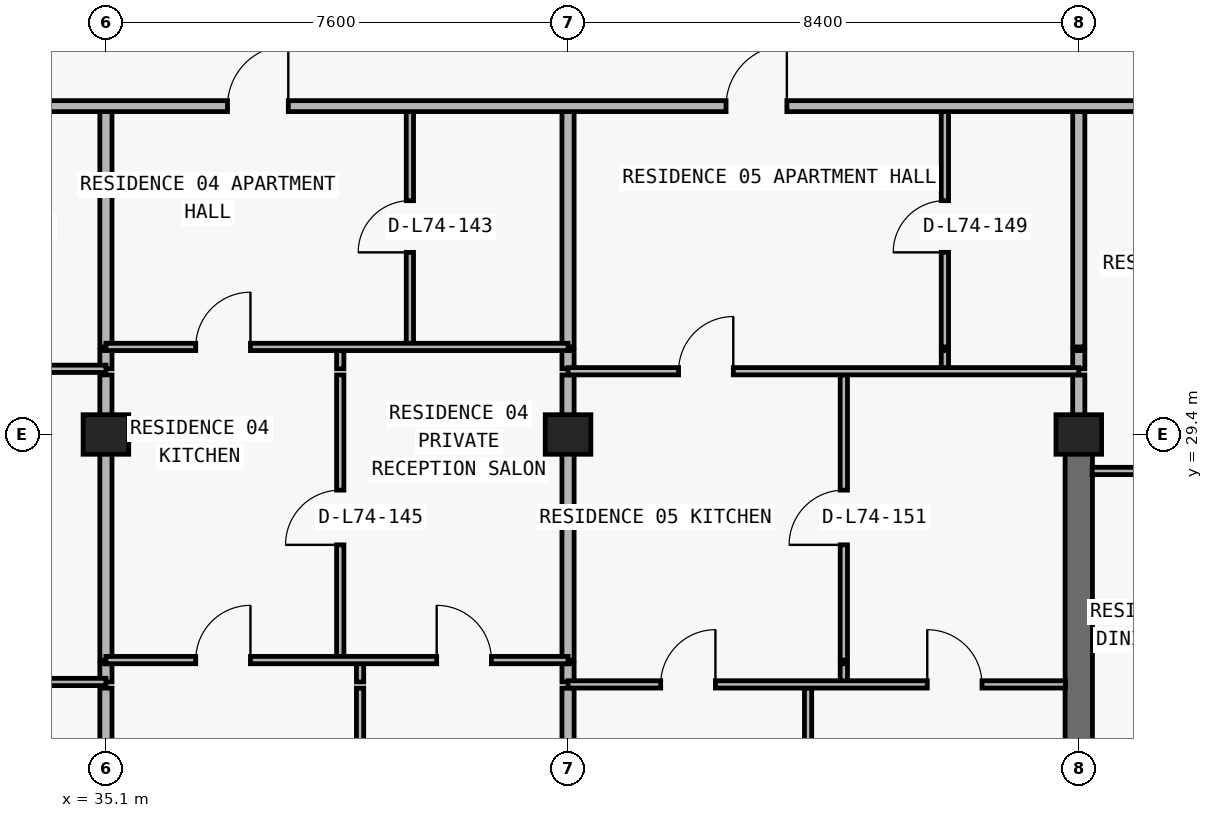
"""IFC4 building model, lengths in metres.
Left out: names, types, materials, properties, quantities, classifications, styles, units other than length and angle.
Written with IfcOpenShell. Run it as: python <this file> out.ifc"""

import sys

from ifc_helpers import new_model, si_unit, direction, frame, frame_2d, origin, origin_2d, place, context, subcontext, project, spatial, rectangle, extrude, element, fill, save


model = new_model("IFC4")
c1 = context("Model", 3, precision=1e-05, world=origin(), true_north=direction((0.0, 1.0)))
c2 = subcontext(c1, "Body", "Model", "MODEL_VIEW")
j1 = project(units=[si_unit("LENGTHUNIT", "METRE"), si_unit("PLANEANGLEUNIT", "RADIAN")], contexts=[c1])
p1 = place(None, origin())
s1 = spatial("IfcSite", under=j1, at=p1, CompositionType="ELEMENT")
p2 = place(p1, origin())
s2 = spatial("IfcBuilding", under=s1, at=p2, CompositionType="ELEMENT")
p3 = place(p2, frame((0.0, 0.0, 262.8)))
s3 = spatial("IfcBuildingStorey", under=s2, at=p3, CompositionType="ELEMENT", Elevation=262.8)
for number, where, z_axis, x_axis in (
    (1, (35.1, 29.4, 0.0), (0.0, 0.0, 1.0), (1.0, 0.0, 0.0)),
    (2, (42.7, 29.4, 0.0), (0.0, 0.0, 1.0), (1.0, 0.0, 0.0)),
    (3, (51.1, 29.4, 0.0), (0.0, 0.0, 1.0), (1.0, 0.0, 0.0)),
):
    element("IfcColumn", number, at=place(p3, frame(where, z_axis=z_axis, x_axis=x_axis)), inside=s3, PredefinedType="COLUMN", context=c2, shape_type="SweptSolid", body=[
        extrude(rectangle(XDim=0.75, YDim=0.65, at=origin_2d()), origin(), (0.0, 0.0, 1.0), 3.05),
    ])
p4 = place(p3, frame((51.1, 20.8, 0.0), z_axis=(0.0, 0.0, 1.0), x_axis=(0.0, 1.0, 0.0)))
e4 = element("IfcWall", 4, at=p4, inside=s3, PredefinedType="SHEAR", context=c2, shape_type="SweptSolid", body=[
    extrude(rectangle(XDim=8.6, YDim=0.45, at=frame_2d((4.3, 0.0))), origin(), (0.0, 0.0, 1.0), 3.05),
])
p5 = place(p3, frame((35.1, 13.34, 0.0), z_axis=(0.0, 0.0, 1.0), x_axis=(0.0, 1.0, 0.0)))
e5 = element("IfcWall", 5, at=p5, inside=s3, PredefinedType="PARTITIONING", context=c2, shape_type="SweptSolid", body=[
    extrude(rectangle(XDim=11.89, YDim=0.2, at=frame_2d((5.945, 0.0))), origin(), (0.0, 0.0, 1.0), 2.263),
])
p6 = place(p3, frame((35.1, 25.33, 0.0), z_axis=(0.0, 0.0, 1.0), x_axis=(0.0, 1.0, 0.0)))
e6 = element("IfcWall", 6, at=p6, inside=s3, PredefinedType="PARTITIONING", context=c2, shape_type="SweptSolid", body=[
    extrude(rectangle(XDim=0.3, YDim=0.2, at=frame_2d((0.15, 0.0))), origin(), (0.0, 0.0, 1.0), 2.263),
])
p7 = place(p3, frame((35.1, 25.69, 0.0), z_axis=(0.0, 0.0, 1.0), x_axis=(0.0, 1.0, 0.0)))
e7 = element("IfcWall", 7, at=p7, inside=s3, PredefinedType="PARTITIONING", context=c2, shape_type="SweptSolid", body=[
    extrude(rectangle(XDim=4.69, YDim=0.2, at=frame_2d((2.345, 0.0))), origin(), (0.0, 0.0, 1.0), 2.263),
])
p8 = place(p3, frame((35.1, 30.48, 0.0), z_axis=(0.0, 0.0, 1.0), x_axis=(0.0, 1.0, 0.0)))
e8 = element("IfcWall", 8, at=p8, inside=s3, PredefinedType="PARTITIONING", context=c2, shape_type="SweptSolid", body=[
    extrude(rectangle(XDim=0.3, YDim=0.2, at=frame_2d((0.15, 0.0))), origin(), (0.0, 0.0, 1.0), 2.263),
])
p9 = place(p3, frame((35.1, 30.84, 0.0), z_axis=(0.0, 0.0, 1.0), x_axis=(0.0, 1.0, 0.0)))
e9 = element("IfcWall", 9, at=p9, inside=s3, PredefinedType="PARTITIONING", context=c2, shape_type="SweptSolid", body=[
    extrude(rectangle(XDim=3.96, YDim=0.2, at=frame_2d((1.98, 0.0))), origin(), (0.0, 0.0, 1.0), 2.263),
])
p10 = place(p3, frame((38.954, 25.69, 0.0), z_axis=(0.0, 0.0, 1.0), x_axis=(0.0, 1.0, 0.0)))
e10 = element("IfcWall", 10, at=p10, inside=s3, PredefinedType="PARTITIONING", context=c2, shape_type="SweptSolid", body=[
    extrude(rectangle(XDim=4.69, YDim=0.12, at=frame_2d((2.345, 0.0))), origin(), (0.0, 0.0, 1.0), 2.725),
])
p11 = place(p10, frame((1.895, 0.0, 0.0)))
e11 = element("IfcOpeningElement", 11, at=p11, cuts=e10, PredefinedType="OPENING", context=c2, shape_type="SweptSolid", body=[
    extrude(rectangle(XDim=0.9, YDim=2.15, at=frame_2d((0.45, 1.075))), frame((0.0, 0.07, 0.0), z_axis=(0.0, -1.0, 0.0), x_axis=(1.0, 0.0, 0.0)), (0.0, 0.0, 1.0), 0.14),
])
p12 = place(p3, frame((38.954, 30.48, 0.0), z_axis=(0.0, 0.0, 1.0), x_axis=(0.0, 1.0, 0.0)))
e12 = element("IfcWall", 12, at=p12, inside=s3, PredefinedType="PARTITIONING", context=c2, shape_type="SweptSolid", body=[
    extrude(rectangle(XDim=0.3, YDim=0.12, at=frame_2d((0.15, 0.0))), origin(), (0.0, 0.0, 1.0), 2.725),
])
p13 = place(p3, frame((39.28, 13.34, 0.0), z_axis=(0.0, 0.0, 1.0), x_axis=(0.0, 1.0, 0.0)))
e13 = element("IfcWall", 13, at=p13, inside=s3, PredefinedType="PARTITIONING", context=c2, shape_type="SweptSolid", body=[
    extrude(rectangle(XDim=11.89, YDim=0.12, at=frame_2d((5.945, 0.0))), origin(), (0.0, 0.0, 1.0), 3.05),
])
p14 = place(p3, frame((39.28, 25.33, 0.0), z_axis=(0.0, 0.0, 1.0), x_axis=(0.0, 1.0, 0.0)))
e14 = element("IfcWall", 14, at=p14, inside=s3, PredefinedType="PARTITIONING", context=c2, shape_type="SweptSolid", body=[
    extrude(rectangle(XDim=0.3, YDim=0.12, at=frame_2d((0.15, 0.0))), origin(), (0.0, 0.0, 1.0), 3.05),
])
p15 = place(p3, frame((40.099, 30.84, 0.0), z_axis=(0.0, 0.0, 1.0), x_axis=(0.0, 1.0, 0.0)))
e15 = element("IfcWall", 15, at=p15, inside=s3, PredefinedType="PARTITIONING", context=c2, shape_type="SweptSolid", body=[
    extrude(rectangle(XDim=3.96, YDim=0.12, at=frame_2d((1.98, 0.0))), origin(), (0.0, 0.0, 1.0), 3.05),
])
p16 = place(p15, frame((1.555, 0.0, 0.0)))
e16 = element("IfcOpeningElement", 16, at=p16, cuts=e15, PredefinedType="OPENING", context=c2, shape_type="SweptSolid", body=[
    extrude(rectangle(XDim=0.85, YDim=2.1, at=frame_2d((0.425, 1.05))), frame((0.0, 0.07, 0.0), z_axis=(0.0, -1.0, 0.0), x_axis=(1.0, 0.0, 0.0)), (0.0, 0.0, 1.0), 0.14),
])
p17 = place(p3, frame((42.7, 13.34, 0.0), z_axis=(0.0, 0.0, 1.0), x_axis=(0.0, 1.0, 0.0)))
e17 = element("IfcWall", 17, at=p17, inside=s3, PredefinedType="PARTITIONING", context=c2, shape_type="SweptSolid", body=[
    extrude(rectangle(XDim=11.89, YDim=0.2, at=frame_2d((5.945, 0.0))), origin(), (0.0, 0.0, 1.0), 2.263),
])
p18 = place(p3, frame((42.7, 25.33, 0.0), z_axis=(0.0, 0.0, 1.0), x_axis=(0.0, 1.0, 0.0)))
e18 = element("IfcWall", 18, at=p18, inside=s3, PredefinedType="PARTITIONING", context=c2, shape_type="SweptSolid", body=[
    extrude(rectangle(XDim=0.3, YDim=0.2, at=frame_2d((0.15, 0.0))), origin(), (0.0, 0.0, 1.0), 2.263),
])
p19 = place(p3, frame((42.7, 25.69, 0.0), z_axis=(0.0, 0.0, 1.0), x_axis=(0.0, 1.0, 0.0)))
e19 = element("IfcWall", 19, at=p19, inside=s3, PredefinedType="PARTITIONING", context=c2, shape_type="SweptSolid", body=[
    extrude(rectangle(XDim=4.69, YDim=0.2, at=frame_2d((2.345, 0.0))), origin(), (0.0, 0.0, 1.0), 2.263),
])
p20 = place(p3, frame((42.7, 30.48, 0.0), z_axis=(0.0, 0.0, 1.0), x_axis=(0.0, 1.0, 0.0)))
e20 = element("IfcWall", 20, at=p20, inside=s3, PredefinedType="PARTITIONING", context=c2, shape_type="SweptSolid", body=[
    extrude(rectangle(XDim=0.3, YDim=0.2, at=frame_2d((0.15, 0.0))), origin(), (0.0, 0.0, 1.0), 2.263),
])
p21 = place(p3, frame((42.7, 30.84, 0.0), z_axis=(0.0, 0.0, 1.0), x_axis=(0.0, 1.0, 0.0)))
e21 = element("IfcWall", 21, at=p21, inside=s3, PredefinedType="PARTITIONING", context=c2, shape_type="SweptSolid", body=[
    extrude(rectangle(XDim=3.96, YDim=0.2, at=frame_2d((1.98, 0.0))), origin(), (0.0, 0.0, 1.0), 2.263),
])
p22 = place(p3, frame((46.648, 13.34, 0.0), z_axis=(0.0, 0.0, 1.0), x_axis=(0.0, 1.0, 0.0)))
e22 = element("IfcWall", 22, at=p22, inside=s3, PredefinedType="PARTITIONING", context=c2, shape_type="SweptSolid", body=[
    extrude(rectangle(XDim=11.89, YDim=0.12, at=frame_2d((5.945, 0.0))), origin(), (0.0, 0.0, 1.0), 3.05),
])
p23 = place(p3, frame((47.236, 25.33, 0.0), z_axis=(0.0, 0.0, 1.0), x_axis=(0.0, 1.0, 0.0)))
e23 = element("IfcWall", 23, at=p23, inside=s3, PredefinedType="PARTITIONING", context=c2, shape_type="SweptSolid", body=[
    extrude(rectangle(XDim=0.3, YDim=0.12, at=frame_2d((0.15, 0.0))), origin(), (0.0, 0.0, 1.0), 3.05),
])
p24 = place(p3, frame((47.236, 25.69, 0.0), z_axis=(0.0, 0.0, 1.0), x_axis=(0.0, 1.0, 0.0)))
e24 = element("IfcWall", 24, at=p24, inside=s3, PredefinedType="PARTITIONING", context=c2, shape_type="SweptSolid", body=[
    extrude(rectangle(XDim=4.69, YDim=0.12, at=frame_2d((2.345, 0.0))), origin(), (0.0, 0.0, 1.0), 3.05),
])
p25 = place(p24, frame((1.895, 0.0, 0.0)))
e25 = element("IfcOpeningElement", 25, at=p25, cuts=e24, PredefinedType="OPENING", context=c2, shape_type="SweptSolid", body=[
    extrude(rectangle(XDim=0.9, YDim=2.15, at=frame_2d((0.45, 1.075))), frame((0.0, 0.07, 0.0), z_axis=(0.0, -1.0, 0.0), x_axis=(1.0, 0.0, 0.0)), (0.0, 0.0, 1.0), 0.14),
])
p26 = place(p3, frame((48.898, 30.48, 0.0), z_axis=(0.0, 0.0, 1.0), x_axis=(0.0, 1.0, 0.0)))
e26 = element("IfcWall", 26, at=p26, inside=s3, PredefinedType="PARTITIONING", context=c2, shape_type="SweptSolid", body=[
    extrude(rectangle(XDim=0.3, YDim=0.12, at=frame_2d((0.15, 0.0))), origin(), (0.0, 0.0, 1.0), 3.05),
])
p27 = place(p3, frame((48.898, 30.84, 0.0), z_axis=(0.0, 0.0, 1.0), x_axis=(0.0, 1.0, 0.0)))
e27 = element("IfcWall", 27, at=p27, inside=s3, PredefinedType="PARTITIONING", context=c2, shape_type="SweptSolid", body=[
    extrude(rectangle(XDim=3.96, YDim=0.12, at=frame_2d((1.98, 0.0))), origin(), (0.0, 0.0, 1.0), 3.05),
])
p28 = place(p27, frame((1.555, 0.0, 0.0)))
e28 = element("IfcOpeningElement", 28, at=p28, cuts=e27, PredefinedType="OPENING", context=c2, shape_type="SweptSolid", body=[
    extrude(rectangle(XDim=0.85, YDim=2.1, at=frame_2d((0.425, 1.05))), frame((0.0, 0.07, 0.0), z_axis=(0.0, -1.0, 0.0), x_axis=(1.0, 0.0, 0.0)), (0.0, 0.0, 1.0), 0.14),
])
p29 = place(p3, frame((51.1, 29.405, 0.0), z_axis=(0.0, 0.0, 1.0), x_axis=(0.0, 1.0, 0.0)))
e29 = element("IfcWall", 29, at=p29, inside=s3, PredefinedType="PARTITIONING", context=c2, shape_type="SweptSolid", body=[
    extrude(rectangle(XDim=0.975, YDim=0.2, at=frame_2d((0.487, 0.0))), origin(), (0.0, 0.0, 1.0), 2.335),
])
p30 = place(p3, frame((51.1, 30.48, 0.0), z_axis=(0.0, 0.0, 1.0), x_axis=(0.0, 1.0, 0.0)))
e30 = element("IfcWall", 30, at=p30, inside=s3, PredefinedType="PARTITIONING", context=c2, shape_type="SweptSolid", body=[
    extrude(rectangle(XDim=0.3, YDim=0.2, at=frame_2d((0.15, 0.0))), origin(), (0.0, 0.0, 1.0), 2.335),
])
p31 = place(p3, frame((51.1, 30.84, 0.0), z_axis=(0.0, 0.0, 1.0), x_axis=(0.0, 1.0, 0.0)))
e31 = element("IfcWall", 31, at=p31, inside=s3, PredefinedType="PARTITIONING", context=c2, shape_type="SweptSolid", body=[
    extrude(rectangle(XDim=3.96, YDim=0.2, at=frame_2d((1.98, 0.0))), origin(), (0.0, 0.0, 1.0), 2.335),
])
p32 = place(p3, frame((42.7, 25.29, 0.0), z_axis=(0.0, 0.0, 1.0), x_axis=(1.0, 0.0, 0.0)))
e32 = element("IfcWall", 32, at=p32, inside=s3, PredefinedType="PARTITIONING", context=c2, shape_type="SweptSolid", body=[
    extrude(rectangle(XDim=8.18, YDim=0.12, at=frame_2d((4.09, 0.0))), origin(), (0.0, 0.0, 1.0), 3.05),
])
p33 = place(p32, frame((1.524, 0.0, 0.0)))
e33 = element("IfcOpeningElement", 33, at=p33, cuts=e32, PredefinedType="OPENING", context=c2, shape_type="SweptSolid", body=[
    extrude(rectangle(XDim=0.9, YDim=2.15, at=frame_2d((0.45, 1.075))), frame((0.0, 0.07, 0.0), z_axis=(0.0, -1.0, 0.0), x_axis=(1.0, 0.0, 0.0)), (0.0, 0.0, 1.0), 0.14),
])
p34 = place(p32, frame((5.908, 0.0, 0.0)))
e34 = element("IfcOpeningElement", 34, at=p34, cuts=e32, PredefinedType="OPENING", context=c2, shape_type="SweptSolid", body=[
    extrude(rectangle(XDim=0.9, YDim=2.15, at=frame_2d((0.45, 1.075))), frame((0.0, 0.07, 0.0), z_axis=(0.0, -1.0, 0.0), x_axis=(1.0, 0.0, 0.0)), (0.0, 0.0, 1.0), 0.14),
])
p35 = place(p3, frame((31.5, 25.33, 0.0), z_axis=(0.0, 0.0, 1.0), x_axis=(1.0, 0.0, 0.0)))
e35 = element("IfcWall", 35, at=p35, inside=s3, PredefinedType="PARTITIONING", context=c2, shape_type="SweptSolid", body=[
    extrude(rectangle(XDim=3.6, YDim=0.12, at=frame_2d((1.8, 0.0))), origin(), (0.0, 0.0, 1.0), 3.05),
])
p36 = place(p35, frame((1.35, 0.0, 0.0)))
e36 = element("IfcOpeningElement", 36, at=p36, cuts=e35, PredefinedType="OPENING", context=c2, shape_type="SweptSolid", body=[
    extrude(rectangle(XDim=0.9, YDim=2.15, at=frame_2d((0.45, 1.075))), frame((0.0, 0.07, 0.0), z_axis=(0.0, -1.0, 0.0), x_axis=(1.0, 0.0, 0.0)), (0.0, 0.0, 1.0), 0.14),
])
p37 = place(p3, frame((35.1, 25.69, 0.0), z_axis=(0.0, 0.0, 1.0), x_axis=(1.0, 0.0, 0.0)))
e37 = element("IfcWall", 37, at=p37, inside=s3, PredefinedType="PARTITIONING", context=c2, shape_type="SweptSolid", body=[
    extrude(rectangle(XDim=7.6, YDim=0.12, at=frame_2d((3.8, 0.0))), origin(), (0.0, 0.0, 1.0), 3.05),
])
p38 = place(p37, frame((1.477, 0.0, 0.0)))
e38 = element("IfcOpeningElement", 38, at=p38, cuts=e37, PredefinedType="OPENING", context=c2, shape_type="SweptSolid", body=[
    extrude(rectangle(XDim=0.9, YDim=2.15, at=frame_2d((0.45, 1.075))), frame((0.0, 0.07, 0.0), z_axis=(0.0, -1.0, 0.0), x_axis=(1.0, 0.0, 0.0)), (0.0, 0.0, 1.0), 0.14),
])
p39 = place(p37, frame((5.44, 0.0, 0.0)))
e39 = element("IfcOpeningElement", 39, at=p39, cuts=e37, PredefinedType="OPENING", context=c2, shape_type="SweptSolid", body=[
    extrude(rectangle(XDim=0.9, YDim=2.15, at=frame_2d((0.45, 1.075))), frame((0.0, 0.07, 0.0), z_axis=(0.0, -1.0, 0.0), x_axis=(1.0, 0.0, 0.0)), (0.0, 0.0, 1.0), 0.14),
])
p40 = place(p3, frame((51.32, 28.8, 0.0), z_axis=(0.0, 0.0, 1.0), x_axis=(1.0, 0.0, 0.0)))
e40 = element("IfcWall", 40, at=p40, inside=s3, PredefinedType="PARTITIONING", context=c2, shape_type="SweptSolid", body=[
    extrude(rectangle(XDim=8.175, YDim=0.12, at=frame_2d((4.087, 0.0))), origin(), (0.0, 0.0, 1.0), 3.05),
])
p41 = place(p40, frame((1.204, 0.0, 0.0)))
e41 = element("IfcOpeningElement", 41, at=p41, cuts=e40, PredefinedType="OPENING", context=c2, shape_type="SweptSolid", body=[
    extrude(rectangle(XDim=0.9, YDim=2.15, at=frame_2d((0.45, 1.075))), frame((0.0, 0.07, 0.0), z_axis=(0.0, -1.0, 0.0), x_axis=(1.0, 0.0, 0.0)), (0.0, 0.0, 1.0), 0.14),
])
p42 = place(p3, frame((42.7, 30.44, 0.0), z_axis=(0.0, 0.0, 1.0), x_axis=(1.0, 0.0, 0.0)))
e42 = element("IfcWall", 42, at=p42, inside=s3, PredefinedType="PARTITIONING", context=c2, shape_type="SweptSolid", body=[
    extrude(rectangle(XDim=8.4, YDim=0.12, at=frame_2d((4.2, 0.0))), origin(), (0.0, 0.0, 1.0), 3.05),
])
p43 = place(p42, frame((1.818, 0.0, 0.0)))
e43 = element("IfcOpeningElement", 43, at=p43, cuts=e42, PredefinedType="OPENING", context=c2, shape_type="SweptSolid", body=[
    extrude(rectangle(XDim=0.9, YDim=2.15, at=frame_2d((0.45, 1.075))), frame((0.0, 0.07, 0.0), z_axis=(0.0, -1.0, 0.0), x_axis=(1.0, 0.0, 0.0)), (0.0, 0.0, 1.0), 0.14),
])
p44 = place(p3, frame((31.5, 30.48, 0.0), z_axis=(0.0, 0.0, 1.0), x_axis=(1.0, 0.0, 0.0)))
e44 = element("IfcWall", 44, at=p44, inside=s3, PredefinedType="PARTITIONING", context=c2, shape_type="SweptSolid", body=[
    extrude(rectangle(XDim=3.6, YDim=0.12, at=frame_2d((1.8, 0.0))), origin(), (0.0, 0.0, 1.0), 3.05),
])
p45 = place(p3, frame((35.1, 30.84, 0.0), z_axis=(0.0, 0.0, 1.0), x_axis=(1.0, 0.0, 0.0)))
e45 = element("IfcWall", 45, at=p45, inside=s3, PredefinedType="PARTITIONING", context=c2, shape_type="SweptSolid", body=[
    extrude(rectangle(XDim=7.6, YDim=0.12, at=frame_2d((3.8, 0.0))), origin(), (0.0, 0.0, 1.0), 3.05),
])
p46 = place(p45, frame((1.477, 0.0, 0.0)))
e46 = element("IfcOpeningElement", 46, at=p46, cuts=e45, PredefinedType="OPENING", context=c2, shape_type="SweptSolid", body=[
    extrude(rectangle(XDim=0.9, YDim=2.15, at=frame_2d((0.45, 1.075))), frame((0.0, 0.07, 0.0), z_axis=(0.0, -1.0, 0.0), x_axis=(1.0, 0.0, 0.0)), (0.0, 0.0, 1.0), 0.14),
])
p47 = place(p3, frame((31.5, 34.8, 0.0), z_axis=(0.0, 0.0, 1.0), x_axis=(1.0, 0.0, 0.0)))
e47 = element("IfcWall", 47, at=p47, inside=s3, PredefinedType="PARTITIONING", context=c2, shape_type="SweptSolid", body=[
    extrude(rectangle(XDim=34.2, YDim=0.18, at=frame_2d((17.1, 0.0))), origin(), (0.0, 0.0, 1.0), 3.05),
])
p48 = place(p47, frame((5.6, 0.0, 0.0)))
e48 = element("IfcOpeningElement", 48, at=p48, cuts=e47, PredefinedType="OPENING", context=c2, shape_type="SweptSolid", body=[
    extrude(rectangle(XDim=1.0, YDim=2.2, at=frame_2d((0.5, 1.1))), frame((0.0, 0.1, 0.0), z_axis=(0.0, -1.0, 0.0), x_axis=(1.0, 0.0, 0.0)), (0.0, 0.0, 1.0), 0.2),
])
p49 = place(p47, frame((13.799, 0.0, 0.0)))
e49 = element("IfcOpeningElement", 49, at=p49, cuts=e47, PredefinedType="OPENING", context=c2, shape_type="SweptSolid", body=[
    extrude(rectangle(XDim=1.0, YDim=2.2, at=frame_2d((0.5, 1.1))), frame((0.0, 0.1, 0.0), z_axis=(0.0, -1.0, 0.0), x_axis=(1.0, 0.0, 0.0)), (0.0, 0.0, 1.0), 0.2),
])
p50 = place(p47, frame((22.483, 0.0, 0.0)))
e50 = element("IfcOpeningElement", 50, at=p50, cuts=e47, PredefinedType="OPENING", context=c2, shape_type="SweptSolid", body=[
    extrude(rectangle(XDim=1.0, YDim=2.2, at=frame_2d((0.5, 1.1))), frame((0.0, 0.1, 0.0), z_axis=(0.0, -1.0, 0.0), x_axis=(1.0, 0.0, 0.0)), (0.0, 0.0, 1.0), 0.2),
])
p51 = place(p48, origin())
e51 = element("IfcDoor", 51, at=p51, inside=s3, OperationType="SINGLE_SWING_RIGHT", PredefinedType="DOOR", context=c2, shape_type="SweptSolid", body=[
    extrude(rectangle(XDim=1.0, YDim=2.2, at=frame_2d((0.5, 1.1))), frame((0.0, 0.025, 0.0), z_axis=(0.0, -1.0, 0.0), x_axis=(1.0, 0.0, 0.0)), (0.0, 0.0, 1.0), 0.05),
])
fill(e48, e51)
p52 = place(p16, origin())
e52 = element("IfcDoor", 52, at=p52, inside=s3, OperationType="SINGLE_SWING_LEFT", PredefinedType="DOOR", context=c2, shape_type="SweptSolid", body=[
    extrude(rectangle(XDim=0.85, YDim=2.1, at=frame_2d((0.425, 1.05))), frame((0.0, 0.025, 0.0), z_axis=(0.0, -1.0, 0.0), x_axis=(1.0, 0.0, 0.0)), (0.0, 0.0, 1.0), 0.05),
])
fill(e16, e52)
p53 = place(p46, origin())
e53 = element("IfcDoor", 53, at=p53, inside=s3, OperationType="SINGLE_SWING_RIGHT", PredefinedType="DOOR", context=c2, shape_type="SweptSolid", body=[
    extrude(rectangle(XDim=0.9, YDim=2.15, at=frame_2d((0.45, 1.075))), frame((0.0, 0.025, 0.0), z_axis=(0.0, -1.0, 0.0), x_axis=(1.0, 0.0, 0.0)), (0.0, 0.0, 1.0), 0.05),
])
fill(e46, e53)
p54 = place(p11, origin())
e54 = element("IfcDoor", 54, at=p54, inside=s3, OperationType="SINGLE_SWING_LEFT", PredefinedType="DOOR", context=c2, shape_type="SweptSolid", body=[
    extrude(rectangle(XDim=0.9, YDim=2.15, at=frame_2d((0.45, 1.075))), frame((0.0, 0.025, 0.0), z_axis=(0.0, -1.0, 0.0), x_axis=(1.0, 0.0, 0.0)), (0.0, 0.0, 1.0), 0.05),
])
fill(e11, e54)
p55 = place(p38, origin())
e55 = element("IfcDoor", 55, at=p55, inside=s3, OperationType="SINGLE_SWING_RIGHT", PredefinedType="DOOR", context=c2, shape_type="SweptSolid", body=[
    extrude(rectangle(XDim=0.9, YDim=2.15, at=frame_2d((0.45, 1.075))), frame((0.0, 0.025, 0.0), z_axis=(0.0, -1.0, 0.0), x_axis=(1.0, 0.0, 0.0)), (0.0, 0.0, 1.0), 0.05),
])
fill(e38, e55)
p56 = place(p39, origin())
e56 = element("IfcDoor", 56, at=p56, inside=s3, OperationType="SINGLE_SWING_LEFT", PredefinedType="DOOR", context=c2, shape_type="SweptSolid", body=[
    extrude(rectangle(XDim=0.9, YDim=2.15, at=frame_2d((0.45, 1.075))), frame((0.0, 0.025, 0.0), z_axis=(0.0, -1.0, 0.0), x_axis=(1.0, 0.0, 0.0)), (0.0, 0.0, 1.0), 0.05),
])
fill(e39, e56)
p57 = place(p49, origin())
e57 = element("IfcDoor", 57, at=p57, inside=s3, OperationType="SINGLE_SWING_RIGHT", PredefinedType="DOOR", context=c2, shape_type="SweptSolid", body=[
    extrude(rectangle(XDim=1.0, YDim=2.2, at=frame_2d((0.5, 1.1))), frame((0.0, 0.025, 0.0), z_axis=(0.0, -1.0, 0.0), x_axis=(1.0, 0.0, 0.0)), (0.0, 0.0, 1.0), 0.05),
])
fill(e49, e57)
p58 = place(p28, origin())
e58 = element("IfcDoor", 58, at=p58, inside=s3, OperationType="SINGLE_SWING_LEFT", PredefinedType="DOOR", context=c2, shape_type="SweptSolid", body=[
    extrude(rectangle(XDim=0.85, YDim=2.1, at=frame_2d((0.425, 1.05))), frame((0.0, 0.025, 0.0), z_axis=(0.0, -1.0, 0.0), x_axis=(1.0, 0.0, 0.0)), (0.0, 0.0, 1.0), 0.05),
])
fill(e28, e58)
p59 = place(p43, origin())
e59 = element("IfcDoor", 59, at=p59, inside=s3, OperationType="SINGLE_SWING_RIGHT", PredefinedType="DOOR", context=c2, shape_type="SweptSolid", body=[
    extrude(rectangle(XDim=0.9, YDim=2.15, at=frame_2d((0.45, 1.075))), frame((0.0, 0.025, 0.0), z_axis=(0.0, -1.0, 0.0), x_axis=(1.0, 0.0, 0.0)), (0.0, 0.0, 1.0), 0.05),
])
fill(e43, e59)
p60 = place(p25, origin())
e60 = element("IfcDoor", 60, at=p60, inside=s3, OperationType="SINGLE_SWING_LEFT", PredefinedType="DOOR", context=c2, shape_type="SweptSolid", body=[
    extrude(rectangle(XDim=0.9, YDim=2.15, at=frame_2d((0.45, 1.075))), frame((0.0, 0.025, 0.0), z_axis=(0.0, -1.0, 0.0), x_axis=(1.0, 0.0, 0.0)), (0.0, 0.0, 1.0), 0.05),
])
fill(e25, e60)
p61 = place(p33, origin())
e61 = element("IfcDoor", 61, at=p61, inside=s3, OperationType="SINGLE_SWING_RIGHT", PredefinedType="DOOR", context=c2, shape_type="SweptSolid", body=[
    extrude(rectangle(XDim=0.9, YDim=2.15, at=frame_2d((0.45, 1.075))), frame((0.0, 0.025, 0.0), z_axis=(0.0, -1.0, 0.0), x_axis=(1.0, 0.0, 0.0)), (0.0, 0.0, 1.0), 0.05),
])
fill(e33, e61)
p62 = place(p34, origin())
e62 = element("IfcDoor", 62, at=p62, inside=s3, OperationType="SINGLE_SWING_LEFT", PredefinedType="DOOR", context=c2, shape_type="SweptSolid", body=[
    extrude(rectangle(XDim=0.9, YDim=2.15, at=frame_2d((0.45, 1.075))), frame((0.0, 0.025, 0.0), z_axis=(0.0, -1.0, 0.0), x_axis=(1.0, 0.0, 0.0)), (0.0, 0.0, 1.0), 0.05),
])
fill(e34, e62)
save(model, sys.argv[1])
